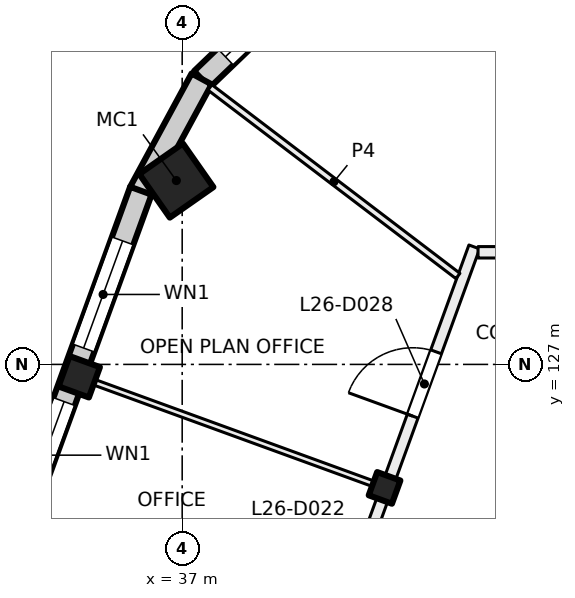
"""IFC4 building model, lengths in metres.
Left out: names, types, materials, properties, quantities, classifications, styles, units other than length and angle.
Written with IfcOpenShell. Run it as: python <this file> out.ifc"""

import sys

from ifc_helpers import new_model, si_unit, direction, frame, frame_2d, origin, origin_2d, place, context, subcontext, project, spatial, rectangle, hollow_rectangle, extrude, element, fill, save


model = new_model("IFC4")
c1 = context("Model", 3, precision=1e-05, world=origin(), true_north=direction((0.0, 1.0)))
c2 = subcontext(c1, "Body", "Model", "MODEL_VIEW")
j1 = project(units=[si_unit("LENGTHUNIT", "METRE"), si_unit("PLANEANGLEUNIT", "RADIAN")], contexts=[c1])
p1 = place(None, origin())
s1 = spatial("IfcSite", under=j1, at=p1, CompositionType="ELEMENT")
p2 = place(p1, origin())
s2 = spatial("IfcBuilding", under=s1, at=p2, CompositionType="ELEMENT")
p3 = place(p2, frame((0.0, 0.0, 113.0)))
s3 = spatial("IfcBuildingStorey", under=s2, at=p3, CompositionType="ELEMENT", Elevation=113.0)
p4 = place(p3, frame((36.846, 131.838, 0.0), z_axis=(0.0, 0.0, 1.0), x_axis=(0.573576436351, -0.819152044289, 0.0)))
e1 = element("IfcColumn", 1, at=p4, inside=s3, PredefinedType="COLUMN", context=c2, shape_type="SweptSolid", body=[
    extrude(hollow_rectangle(XDim=1.4, YDim=1.4, WallThickness=0.04, at=origin_2d()), origin(), (0.0, 0.0, 1.0), 4.0),
])
p5 = place(p3, frame((42.325, 123.751, 0.0), z_axis=(0.0, 0.0, 1.0), x_axis=(-0.342020143326, -0.939692620786, 0.0)))
e2 = element("IfcColumn", 2, at=p5, inside=s3, PredefinedType="COLUMN", context=c2, shape_type="SweptSolid", body=[
    extrude(rectangle(XDim=0.65, YDim=0.65, at=origin_2d()), origin(), (0.0, 0.0, 1.0), 4.0),
])
p6 = place(p3, frame((34.291, 126.675, 0.0), z_axis=(0.0, 0.0, 1.0), x_axis=(-0.342020143326, -0.939692620786, 0.0)))
e3 = element("IfcColumn", 3, at=p6, inside=s3, PredefinedType="COLUMN", context=c2, shape_type="SweptSolid", body=[
    extrude(rectangle(XDim=0.85, YDim=0.85, at=origin_2d()), origin(), (0.0, 0.0, 1.0), 4.0),
])
p7 = place(p3, frame((37.52, 134.501, 0.0), z_axis=(0.0, 0.0, 1.0), x_axis=(0.72115684486, 0.692771827596, 0.0)))
e4 = element("IfcWall", 4, at=p7, inside=s3, PredefinedType="SOLIDWALL", context=c2, shape_type="SweptSolid", body=[
    extrude(rectangle(XDim=3.303, YDim=0.6, at=frame_2d((1.651, 0.0))), origin(), (0.0, 0.0, 1.0), 3.625),
])
p8 = place(p7, frame((0.856, 0.0, 0.9)))
e5 = element("IfcOpeningElement", 5, at=p8, cuts=e4, PredefinedType="OPENING", context=c2, shape_type="SweptSolid", body=[
    extrude(rectangle(XDim=1.5, YDim=2.4, at=frame_2d((0.75, 1.2))), frame((0.0, 0.31, 0.0), z_axis=(0.0, -1.0, 0.0), x_axis=(1.0, 0.0, 0.0)), (0.0, 0.0, 1.0), 0.62),
])
p9 = place(p3, frame((35.895, 131.53, 0.0), z_axis=(0.0, 0.0, 1.0), x_axis=(0.476531180538, 0.879157570618, 0.0)))
e6 = element("IfcWall", 6, at=p9, inside=s3, PredefinedType="SOLIDWALL", context=c2, shape_type="SweptSolid", body=[
    extrude(rectangle(XDim=3.393, YDim=0.6, at=frame_2d((1.696, 0.0))), origin(), (0.0, 0.0, 1.0), 3.625),
])
p10 = place(p3, frame((24.666, 100.669, 0.0), z_axis=(0.0, 0.0, 1.0), x_axis=(0.34201964167, 0.939692803373, 0.0)))
e7 = element("IfcWall", 7, at=p10, inside=s3, PredefinedType="SOLIDWALL", context=c2, shape_type="SweptSolid", body=[
    extrude(rectangle(XDim=32.884, YDim=0.6, at=frame_2d((16.442, 0.0))), origin(), (0.0, 0.0, 1.0), 3.625),
])
p11 = place(p10, frame((1.48, 0.0, 0.9)))
e8 = element("IfcOpeningElement", 8, at=p11, cuts=e7, PredefinedType="OPENING", context=c2, shape_type="SweptSolid", body=[
    extrude(rectangle(XDim=3.0, YDim=2.4, at=frame_2d((1.5, 1.2))), frame((0.0, 0.31, 0.0), z_axis=(0.0, -1.0, 0.0), x_axis=(1.0, 0.0, 0.0)), (0.0, 0.0, 1.0), 0.62),
])
p12 = place(p10, frame((5.98, 0.0, 0.9)))
e9 = element("IfcOpeningElement", 9, at=p12, cuts=e7, PredefinedType="OPENING", context=c2, shape_type="SweptSolid", body=[
    extrude(rectangle(XDim=3.0, YDim=2.4, at=frame_2d((1.5, 1.2))), frame((0.0, 0.31, 0.0), z_axis=(0.0, -1.0, 0.0), x_axis=(1.0, 0.0, 0.0)), (0.0, 0.0, 1.0), 0.62),
])
p13 = place(p10, frame((10.48, 0.0, 0.9)))
e10 = element("IfcOpeningElement", 10, at=p13, cuts=e7, PredefinedType="OPENING", context=c2, shape_type="SweptSolid", body=[
    extrude(rectangle(XDim=3.0, YDim=2.4, at=frame_2d((1.5, 1.2))), frame((0.0, 0.31, 0.0), z_axis=(0.0, -1.0, 0.0), x_axis=(1.0, 0.0, 0.0)), (0.0, 0.0, 1.0), 0.62),
])
p14 = place(p10, frame((14.98, 0.0, 0.9)))
e11 = element("IfcOpeningElement", 11, at=p14, cuts=e7, PredefinedType="OPENING", context=c2, shape_type="SweptSolid", body=[
    extrude(rectangle(XDim=3.0, YDim=2.4, at=frame_2d((1.5, 1.2))), frame((0.0, 0.31, 0.0), z_axis=(0.0, -1.0, 0.0), x_axis=(1.0, 0.0, 0.0)), (0.0, 0.0, 1.0), 0.62),
])
p15 = place(p10, frame((19.48, 0.0, 0.9)))
e12 = element("IfcOpeningElement", 12, at=p15, cuts=e7, PredefinedType="OPENING", context=c2, shape_type="SweptSolid", body=[
    extrude(rectangle(XDim=3.0, YDim=2.4, at=frame_2d((1.5, 1.2))), frame((0.0, 0.31, 0.0), z_axis=(0.0, -1.0, 0.0), x_axis=(1.0, 0.0, 0.0)), (0.0, 0.0, 1.0), 0.62),
])
p16 = place(p10, frame((23.98, 0.0, 0.9)))
e13 = element("IfcOpeningElement", 13, at=p16, cuts=e7, PredefinedType="OPENING", context=c2, shape_type="SweptSolid", body=[
    extrude(rectangle(XDim=3.0, YDim=2.4, at=frame_2d((1.5, 1.2))), frame((0.0, 0.31, 0.0), z_axis=(0.0, -1.0, 0.0), x_axis=(1.0, 0.0, 0.0)), (0.0, 0.0, 1.0), 0.62),
])
p17 = place(p10, frame((28.48, 0.0, 0.9)))
e14 = element("IfcOpeningElement", 14, at=p17, cuts=e7, PredefinedType="OPENING", context=c2, shape_type="SweptSolid", body=[
    extrude(rectangle(XDim=3.0, YDim=2.4, at=frame_2d((1.5, 1.2))), frame((0.0, 0.31, 0.0), z_axis=(0.0, -1.0, 0.0), x_axis=(1.0, 0.0, 0.0)), (0.0, 0.0, 1.0), 0.62),
])
p18 = place(p3, frame((32.881, 97.657, 0.0), z_axis=(0.0, 0.0, 1.0), x_axis=(0.342017360004, 0.939693633828, 0.0)))
e15 = element("IfcWall", 15, at=p18, inside=s3, PredefinedType="PARTITIONING", context=c2, shape_type="SweptSolid", body=[
    extrude(rectangle(XDim=34.516, YDim=0.3, at=frame_2d((17.258, 0.0))), origin(), (0.0, 0.0, 1.0), 3.625),
])
p19 = place(p18, frame((2.025, 0.0, 0.0)))
e16 = element("IfcOpeningElement", 16, at=p19, cuts=e15, PredefinedType="OPENING", context=c2, shape_type="SweptSolid", body=[
    extrude(rectangle(XDim=1.2, YDim=2.1, at=frame_2d((0.6, 1.05))), frame((0.0, 0.16, 0.0), z_axis=(0.0, -1.0, 0.0), x_axis=(1.0, 0.0, 0.0)), (0.0, 0.0, 1.0), 0.32),
])
p20 = place(p18, frame((7.0, 0.0, 0.0)))
e17 = element("IfcOpeningElement", 17, at=p20, cuts=e15, PredefinedType="OPENING", context=c2, shape_type="SweptSolid", body=[
    extrude(rectangle(XDim=1.0, YDim=2.1, at=frame_2d((0.5, 1.05))), frame((0.0, 0.16, 0.0), z_axis=(0.0, -1.0, 0.0), x_axis=(1.0, 0.0, 0.0)), (0.0, 0.0, 1.0), 0.32),
])
p21 = place(p18, frame((11.5, 0.0, 0.0)))
e18 = element("IfcOpeningElement", 18, at=p21, cuts=e15, PredefinedType="OPENING", context=c2, shape_type="SweptSolid", body=[
    extrude(rectangle(XDim=1.0, YDim=2.1, at=frame_2d((0.5, 1.05))), frame((0.0, 0.16, 0.0), z_axis=(0.0, -1.0, 0.0), x_axis=(1.0, 0.0, 0.0)), (0.0, 0.0, 1.0), 0.32),
])
p22 = place(p18, frame((16.0, 0.0, 0.0)))
e19 = element("IfcOpeningElement", 19, at=p22, cuts=e15, PredefinedType="OPENING", context=c2, shape_type="SweptSolid", body=[
    extrude(rectangle(XDim=1.0, YDim=2.1, at=frame_2d((0.5, 1.05))), frame((0.0, 0.16, 0.0), z_axis=(0.0, -1.0, 0.0), x_axis=(1.0, 0.0, 0.0)), (0.0, 0.0, 1.0), 0.32),
])
p23 = place(p18, frame((20.5, 0.0, 0.0)))
e20 = element("IfcOpeningElement", 20, at=p23, cuts=e15, PredefinedType="OPENING", context=c2, shape_type="SweptSolid", body=[
    extrude(rectangle(XDim=1.0, YDim=2.1, at=frame_2d((0.5, 1.05))), frame((0.0, 0.16, 0.0), z_axis=(0.0, -1.0, 0.0), x_axis=(1.0, 0.0, 0.0)), (0.0, 0.0, 1.0), 0.32),
])
p24 = place(p18, frame((25.0, 0.0, 0.0)))
e21 = element("IfcOpeningElement", 21, at=p24, cuts=e15, PredefinedType="OPENING", context=c2, shape_type="SweptSolid", body=[
    extrude(rectangle(XDim=1.0, YDim=2.1, at=frame_2d((0.5, 1.05))), frame((0.0, 0.16, 0.0), z_axis=(0.0, -1.0, 0.0), x_axis=(1.0, 0.0, 0.0)), (0.0, 0.0, 1.0), 0.32),
])
p25 = place(p18, frame((29.779, 0.0, 0.0)))
e22 = element("IfcOpeningElement", 22, at=p25, cuts=e15, PredefinedType="OPENING", context=c2, shape_type="SweptSolid", body=[
    extrude(rectangle(XDim=1.8, YDim=2.1, at=frame_2d((0.9, 1.05))), frame((0.0, 0.16, 0.0), z_axis=(0.0, -1.0, 0.0), x_axis=(1.0, 0.0, 0.0)), (0.0, 0.0, 1.0), 0.32),
])
p26 = place(p3, frame((42.231, 123.785, 0.0), z_axis=(0.0, 0.0, 1.0), x_axis=(-0.939687752599, 0.342033518263, 0.0)))
e23 = element("IfcWall", 23, at=p26, inside=s3, PredefinedType="PARTITIONING", context=c2, shape_type="SweptSolid", body=[
    extrude(rectangle(XDim=8.301, YDim=0.15, at=frame_2d((4.15, 0.0))), origin(), (0.0, 0.0, 1.0), 3.625),
])
p27 = place(p3, frame((44.256, 129.327, 0.0), z_axis=(0.0, 0.0, 1.0), x_axis=(-0.796040504107, 0.605243352563, 0.0)))
e24 = element("IfcWall", 24, at=p27, inside=s3, PredefinedType="PARTITIONING", context=c2, shape_type="SweptSolid", body=[
    extrude(rectangle(XDim=8.197, YDim=0.175, at=frame_2d((4.099, 0.0))), origin(), (0.0, 0.0, 1.0), 3.625),
])
p28 = place(p3, frame((44.785, 129.95, 0.0), z_axis=(0.0, 0.0, 1.0), x_axis=(1.0, 0.0, 0.0)))
e25 = element("IfcWall", 25, at=p28, inside=s3, PredefinedType="PARTITIONING", context=c2, shape_type="SweptSolid", body=[
    extrude(rectangle(XDim=19.115, YDim=0.3, at=frame_2d((9.558, 0.0))), origin(), (0.0, 0.0, 1.0), 3.625),
])
p29 = place(p28, frame((15.615, 0.0, 0.0)))
e26 = element("IfcOpeningElement", 26, at=p29, cuts=e25, PredefinedType="OPENING", context=c2, shape_type="SweptSolid", body=[
    extrude(rectangle(XDim=1.2, YDim=2.1, at=frame_2d((0.6, 1.05))), frame((0.0, 0.16, 0.0), z_axis=(0.0, -1.0, 0.0), x_axis=(1.0, 0.0, 0.0)), (0.0, 0.0, 1.0), 0.32),
])
p30 = place(p28, frame((11.115, 0.0, 0.0)))
e27 = element("IfcOpeningElement", 27, at=p30, cuts=e25, PredefinedType="OPENING", context=c2, shape_type="SweptSolid", body=[
    extrude(rectangle(XDim=1.2, YDim=2.1, at=frame_2d((0.6, 1.05))), frame((0.0, 0.16, 0.0), z_axis=(0.0, -1.0, 0.0), x_axis=(1.0, 0.0, 0.0)), (0.0, 0.0, 1.0), 0.32),
])
p31 = place(p28, frame((4.123, 0.0, 0.0)))
e28 = element("IfcOpeningElement", 28, at=p31, cuts=e25, PredefinedType="OPENING", context=c2, shape_type="SweptSolid", body=[
    extrude(rectangle(XDim=1.2, YDim=2.1, at=frame_2d((0.6, 1.05))), frame((0.0, 0.16, 0.0), z_axis=(0.0, -1.0, 0.0), x_axis=(1.0, 0.0, 0.0)), (0.0, 0.0, 1.0), 0.32),
])
p32 = place(p3, frame((47.314, 125.909, 0.0), z_axis=(0.0, 0.0, 1.0), x_axis=(-0.342010770371, -0.939696032209, 0.0)))
e29 = element("IfcWall", 29, at=p32, inside=s3, PredefinedType="PARTITIONING", context=c2, shape_type="SweptSolid", body=[
    extrude(rectangle(XDim=31.485, YDim=0.3, at=frame_2d((15.742, 0.0))), origin(), (0.0, 0.0, 1.0), 3.625),
])
p33 = place(p32, frame((28.259, 0.0, 0.0)))
e30 = element("IfcOpeningElement", 30, at=p33, cuts=e29, PredefinedType="OPENING", context=c2, shape_type="SweptSolid", body=[
    extrude(rectangle(XDim=1.2, YDim=2.1, at=frame_2d((0.6, 1.05))), frame((0.0, 0.16, 0.0), z_axis=(0.0, -1.0, 0.0), x_axis=(1.0, 0.0, 0.0)), (0.0, 0.0, 1.0), 0.32),
])
p34 = place(p32, frame((18.584, 0.0, 0.0)))
e31 = element("IfcOpeningElement", 31, at=p34, cuts=e29, PredefinedType="OPENING", context=c2, shape_type="SweptSolid", body=[
    extrude(rectangle(XDim=1.8, YDim=2.1, at=frame_2d((0.9, 1.05))), frame((0.0, 0.16, 0.0), z_axis=(0.0, -1.0, 0.0), x_axis=(1.0, 0.0, 0.0)), (0.0, 0.0, 1.0), 0.32),
])
p35 = place(p32, frame((9.985, 0.0, 0.0)))
e32 = element("IfcOpeningElement", 32, at=p35, cuts=e29, PredefinedType="OPENING", context=c2, shape_type="SweptSolid", body=[
    extrude(rectangle(XDim=1.0, YDim=2.1, at=frame_2d((0.5, 1.05))), frame((0.0, 0.16, 0.0), z_axis=(0.0, -1.0, 0.0), x_axis=(1.0, 0.0, 0.0)), (0.0, 0.0, 1.0), 0.32),
])
p36 = place(p32, frame((5.484, 0.0, 0.0)))
e33 = element("IfcOpeningElement", 33, at=p36, cuts=e29, PredefinedType="OPENING", context=c2, shape_type="SweptSolid", body=[
    extrude(rectangle(XDim=1.0, YDim=2.1, at=frame_2d((0.5, 1.05))), frame((0.0, 0.16, 0.0), z_axis=(0.0, -1.0, 0.0), x_axis=(1.0, 0.0, 0.0)), (0.0, 0.0, 1.0), 0.32),
])
p37 = place(p8, origin())
e34 = element("IfcWindow", 34, at=p37, inside=s3, PartitioningType="SINGLE_PANEL", PredefinedType="WINDOW", context=c2, shape_type="SweptSolid", body=[
    extrude(rectangle(XDim=1.5, YDim=2.4, at=frame_2d((0.75, 1.2))), frame((0.0, 0.03, 0.0), z_axis=(0.0, -1.0, 0.0), x_axis=(1.0, 0.0, 0.0)), (0.0, 0.0, 1.0), 0.06),
])
fill(e5, e34)
p38 = place(p16, origin())
e35 = element("IfcWindow", 35, at=p38, inside=s3, PartitioningType="SINGLE_PANEL", PredefinedType="WINDOW", context=c2, shape_type="SweptSolid", body=[
    extrude(rectangle(XDim=3.0, YDim=2.4, at=frame_2d((1.5, 1.2))), frame((0.0, 0.03, 0.0), z_axis=(0.0, -1.0, 0.0), x_axis=(1.0, 0.0, 0.0)), (0.0, 0.0, 1.0), 0.06),
])
fill(e13, e35)
p39 = place(p17, origin())
e36 = element("IfcWindow", 36, at=p39, inside=s3, PartitioningType="SINGLE_PANEL", PredefinedType="WINDOW", context=c2, shape_type="SweptSolid", body=[
    extrude(rectangle(XDim=3.0, YDim=2.4, at=frame_2d((1.5, 1.2))), frame((0.0, 0.03, 0.0), z_axis=(0.0, -1.0, 0.0), x_axis=(1.0, 0.0, 0.0)), (0.0, 0.0, 1.0), 0.06),
])
fill(e14, e36)
p40 = place(p25, origin())
e37 = element("IfcDoor", 37, at=p40, inside=s3, OperationType="DOUBLE_DOOR_SINGLE_SWING", PredefinedType="DOOR", context=c2, shape_type="SweptSolid", body=[
    extrude(rectangle(XDim=1.8, YDim=2.1, at=frame_2d((0.9, 1.05))), frame((0.0, 0.025, 0.0), z_axis=(0.0, -1.0, 0.0), x_axis=(1.0, 0.0, 0.0)), (0.0, 0.0, 1.0), 0.05),
])
fill(e22, e37)
save(model, sys.argv[1])
